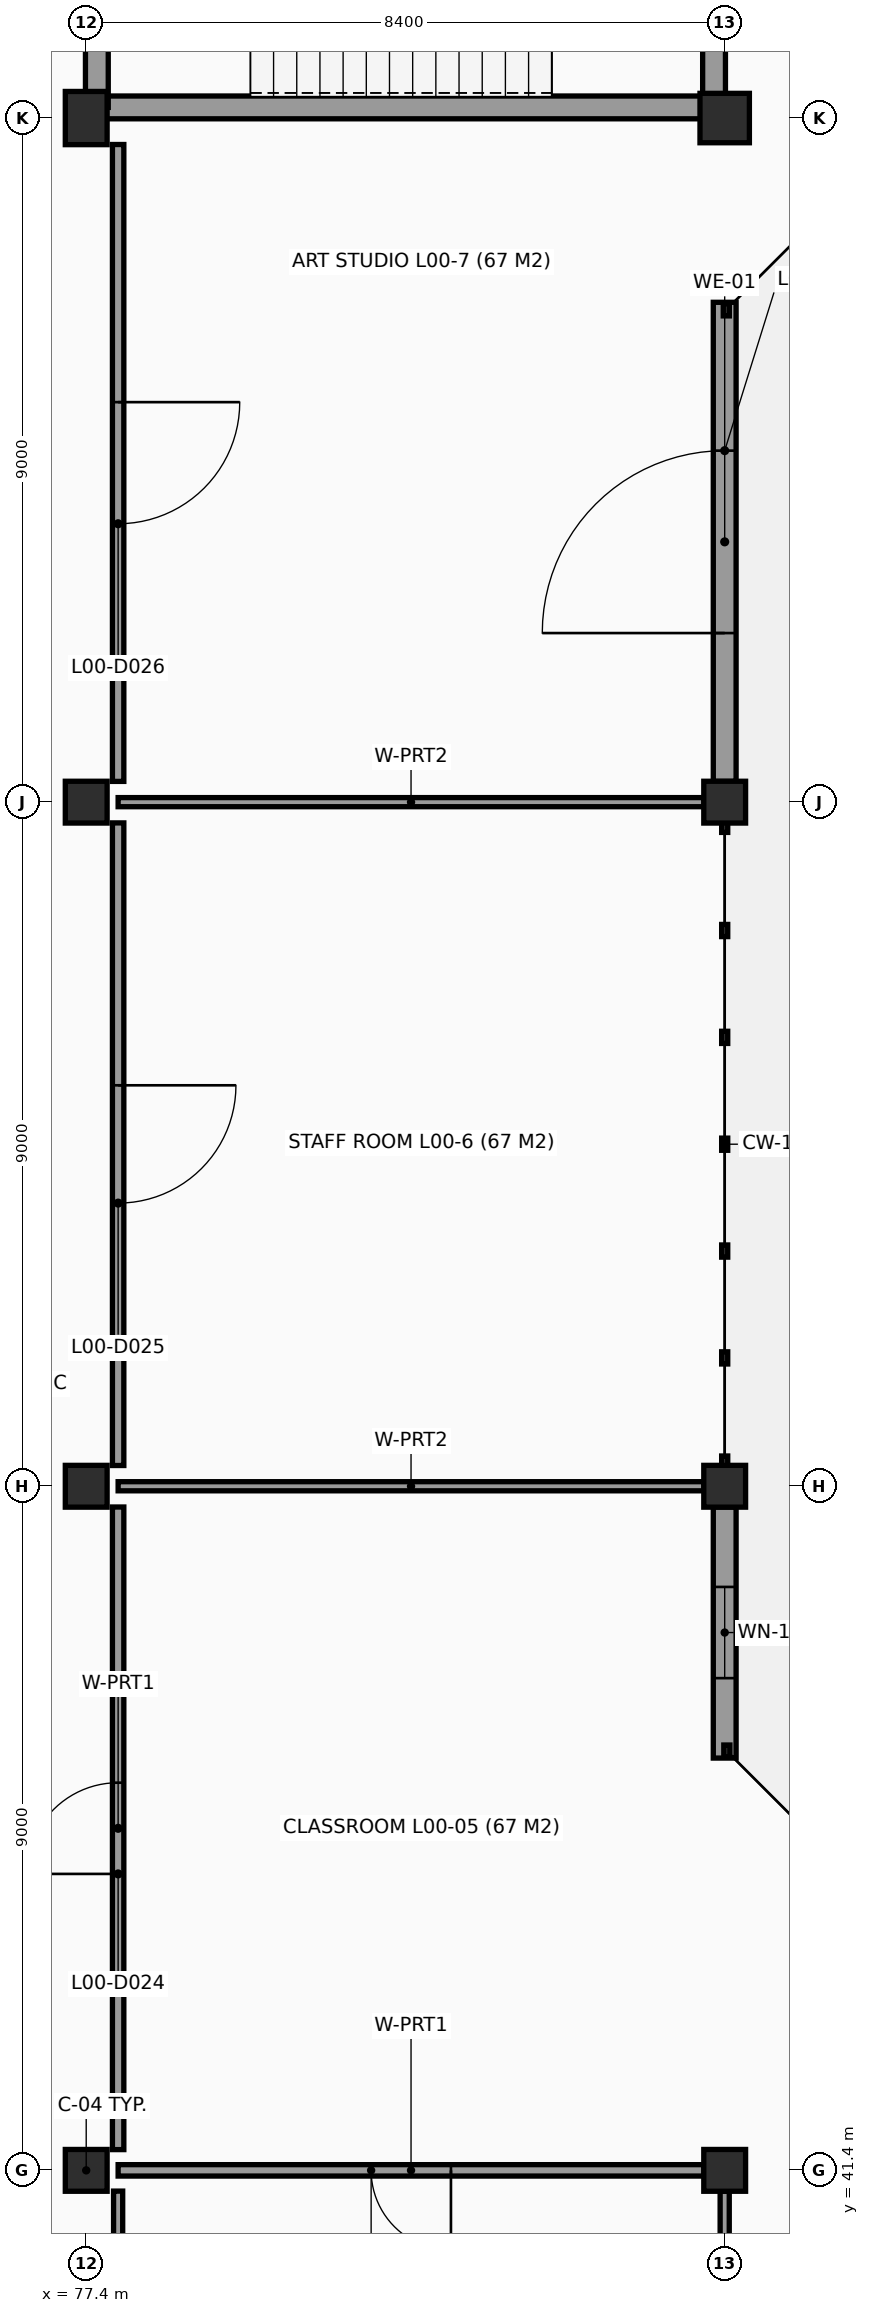
"""IFC4 building model, lengths in metres.
Left out: names, types, materials, properties, quantities, classifications, styles, units other than length and angle.
Written with IfcOpenShell. Run it as: python <this file> out.ifc"""

import sys

from ifc_helpers import new_model, si_unit, direction, frame, frame_2d, origin, origin_2d, place, context, subcontext, project, spatial, rectangle, extrude, element, fill, save


model = new_model("IFC4")
c1 = context("Model", 3, precision=1e-05, world=origin(), true_north=direction((0.0, 1.0)))
c2 = subcontext(c1, "Body", "Model", "MODEL_VIEW")
j1 = project(units=[si_unit("LENGTHUNIT", "METRE"), si_unit("PLANEANGLEUNIT", "RADIAN")], contexts=[c1])
p1 = place(None, origin())
s1 = spatial("IfcSite", under=j1, at=p1, CompositionType="ELEMENT")
p2 = place(p1, origin())
s2 = spatial("IfcBuilding", under=s1, at=p2, CompositionType="ELEMENT")
p3 = place(p2, origin())
s3 = spatial("IfcBuildingStorey", under=s2, at=p3, CompositionType="ELEMENT", Elevation=0.0)
for number, where, z_axis, x_axis in (
    (1, (77.4, 41.4, -0.4), (0.0, 0.0, 1.0), (1.0, 0.0, 0.0)),
    (2, (77.4, 50.4, -0.4), (0.0, 0.0, 1.0), (1.0, 0.0, 0.0)),
    (3, (77.4, 59.4, -0.4), (0.0, 0.0, 1.0), (1.0, 0.0, 0.0)),
):
    element("IfcColumn", number, at=place(p3, frame(where, z_axis=z_axis, x_axis=x_axis)), inside=s3, PredefinedType="COLUMN", context=c2, shape_type="SweptSolid", body=[
        extrude(rectangle(XDim=0.55, YDim=0.55, at=origin_2d()), origin(), (0.0, 0.0, 1.0), 4.6),
    ])
p4 = place(p3, frame((77.4, 68.4, -0.4), z_axis=(0.0, 0.0, 1.0), x_axis=(1.0, 0.0, 0.0)))
e4 = element("IfcColumn", 4, at=p4, inside=s3, PredefinedType="COLUMN", context=c2, shape_type="SweptSolid", body=[
    extrude(rectangle(XDim=0.55, YDim=0.7, at=origin_2d()), origin(), (0.0, 0.0, 1.0), 4.6),
])
for number, where, z_axis, x_axis in (
    (5, (85.8, 41.4, -0.4), (0.0, 0.0, 1.0), (1.0, 0.0, 0.0)),
    (6, (85.8, 50.4, -0.4), (0.0, 0.0, 1.0), (1.0, 0.0, 0.0)),
    (7, (85.8, 59.4, -0.4), (0.0, 0.0, 1.0), (1.0, 0.0, 0.0)),
):
    element("IfcColumn", number, at=place(p3, frame(where, z_axis=z_axis, x_axis=x_axis)), inside=s3, PredefinedType="COLUMN", context=c2, shape_type="SweptSolid", body=[
        extrude(rectangle(XDim=0.55, YDim=0.55, at=origin_2d()), origin(), (0.0, 0.0, 1.0), 4.6),
    ])
p5 = place(p3, frame((85.8, 68.4, -0.4), z_axis=(0.0, 0.0, 1.0), x_axis=(1.0, 0.0, 0.0)))
e8 = element("IfcColumn", 8, at=p5, inside=s3, PredefinedType="COLUMN", context=c2, shape_type="SweptSolid", body=[
    extrude(rectangle(XDim=0.65, YDim=0.65, at=origin_2d()), origin(), (0.0, 0.0, 1.0), 4.6),
])
p6 = place(p3, frame((85.8, 65.976, 0.0), z_axis=(0.0, 0.0, 1.0), x_axis=(0.0, -1.0, 0.0)))
e9 = element("IfcWall", 9, at=p6, inside=s3, PredefinedType="SOLIDWALL", context=c2, shape_type="SweptSolid", body=[
    extrude(rectangle(XDim=6.303, YDim=0.3, at=frame_2d((3.151, 0.0))), origin(), (0.0, 0.0, 1.0), 3.22),
])
p7 = place(p6, frame((1.951, 0.0, 0.0)))
e10 = element("IfcOpeningElement", 10, at=p7, cuts=e9, PredefinedType="OPENING", context=c2, shape_type="SweptSolid", body=[
    extrude(rectangle(XDim=2.4, YDim=2.45, at=frame_2d((1.2, 1.225))), frame((0.0, 0.16, 0.0), z_axis=(0.0, -1.0, 0.0), x_axis=(1.0, 0.0, 0.0)), (0.0, 0.0, 1.0), 0.32),
])
p8 = place(p3, frame((85.8, 50.127, 0.0), z_axis=(0.0, 0.0, 1.0), x_axis=(0.0, -1.0, 0.0)))
e11 = element("IfcWall", 11, at=p8, inside=s3, PredefinedType="SOLIDWALL", context=c2, shape_type="SweptSolid", body=[
    extrude(rectangle(XDim=3.303, YDim=0.3, at=frame_2d((1.651, 0.0))), origin(), (0.0, 0.0, 1.0), 3.32),
])
p9 = place(p8, frame((1.052, 0.0, 0.95)))
e12 = element("IfcOpeningElement", 12, at=p9, cuts=e11, PredefinedType="OPENING", context=c2, shape_type="SweptSolid", body=[
    extrude(rectangle(XDim=1.2, YDim=1.75, at=frame_2d((0.6, 0.875))), frame((0.0, 0.16, 0.0), z_axis=(0.0, -1.0, 0.0), x_axis=(1.0, 0.0, 0.0)), (0.0, 0.0, 1.0), 0.32),
])
p10 = place(p3, frame((77.54, 68.54, -0.4), z_axis=(0.0, 0.0, 1.0), x_axis=(1.0, 0.0, 0.0)))
e13 = element("IfcWall", 13, at=p10, inside=s3, PredefinedType="SHEAR", context=c2, shape_type="SweptSolid", body=[
    extrude(rectangle(XDim=8.12, YDim=0.3, at=frame_2d((4.06, 0.0))), origin(), (0.0, 0.0, 1.0), 4.6),
])
for number, where, z_axis, x_axis in (
    (14, (85.66, 68.54, -0.4), (0.0, 0.0, 1.0), (0.0, 1.0, 0.0)),
    (15, (77.54, 72.74, -0.4), (0.0, 0.0, 1.0), (0.0, -1.0, 0.0)),
):
    element("IfcWall", number, at=place(p3, frame(where, z_axis=z_axis, x_axis=x_axis)), inside=s3, PredefinedType="SHEAR", context=c2, shape_type="SweptSolid", body=[
        extrude(rectangle(XDim=4.2, YDim=0.3, at=frame_2d((2.1, 0.0))), origin(), (0.0, 0.0, 1.0), 4.6),
    ])
p11 = place(p3, frame((77.82, 41.4, 0.0), z_axis=(0.0, 0.0, 1.0), x_axis=(1.0, 0.0, 0.0)))
e16 = element("IfcWall", 16, at=p11, inside=s3, PredefinedType="PARTITIONING", context=c2, shape_type="SweptSolid", body=[
    extrude(rectangle(XDim=7.707, YDim=0.15, at=frame_2d((3.854, 0.0))), origin(), (0.0, 0.0, 1.0), 3.12),
])
p12 = place(p11, frame((3.329, 0.0, 0.0)))
e17 = element("IfcOpeningElement", 17, at=p12, cuts=e16, PredefinedType="OPENING", context=c2, shape_type="SweptSolid", body=[
    extrude(rectangle(XDim=1.05, YDim=2.15, at=frame_2d((0.525, 1.075))), frame((0.0, 0.085, 0.0), z_axis=(0.0, -1.0, 0.0), x_axis=(1.0, 0.0, 0.0)), (0.0, 0.0, 1.0), 0.17),
])
p13 = place(p3, frame((85.8, 41.127, 0.0), z_axis=(0.0, 0.0, 1.0), x_axis=(0.0, -1.0, 0.0)))
e18 = element("IfcWall", 18, at=p13, inside=s3, PredefinedType="PARTITIONING", context=c2, shape_type="SweptSolid", body=[
    extrude(rectangle(XDim=8.404, YDim=0.12, at=frame_2d((4.202, 0.0))), origin(), (0.0, 0.0, 1.0), 3.32),
])
p14 = place(p3, frame((77.82, 32.723, 0.0), z_axis=(0.0, 0.0, 1.0), x_axis=(0.0, 1.0, 0.0)))
e19 = element("IfcWall", 19, at=p14, inside=s3, PredefinedType="PARTITIONING", context=c2, shape_type="SweptSolid", body=[
    extrude(rectangle(XDim=8.404, YDim=0.12, at=frame_2d((4.202, 0.0))), origin(), (0.0, 0.0, 1.0), 3.59),
])
p15 = place(p3, frame((77.82, 41.673, 0.0), z_axis=(0.0, 0.0, 1.0), x_axis=(0.0, 1.0, 0.0)))
e20 = element("IfcWall", 20, at=p15, inside=s3, PredefinedType="PARTITIONING", context=c2, shape_type="SweptSolid", body=[
    extrude(rectangle(XDim=8.454, YDim=0.15, at=frame_2d((4.227, 0.0))), origin(), (0.0, 0.0, 1.0), 3.62),
])
p16 = place(p15, frame((3.627, 0.0, 0.0)))
e21 = element("IfcOpeningElement", 21, at=p16, cuts=e20, PredefinedType="OPENING", context=c2, shape_type="SweptSolid", body=[
    extrude(rectangle(XDim=1.2, YDim=2.15, at=frame_2d((0.6, 1.075))), frame((0.0, 0.085, 0.0), z_axis=(0.0, -1.0, 0.0), x_axis=(1.0, 0.0, 0.0)), (0.0, 0.0, 1.0), 0.17),
])
p17 = place(p3, frame((77.82, 50.4, 0.0), z_axis=(0.0, 0.0, 1.0), x_axis=(1.0, 0.0, 0.0)))
e22 = element("IfcWall", 22, at=p17, inside=s3, PredefinedType="PARTITIONING", context=c2, shape_type="SweptSolid", body=[
    extrude(rectangle(XDim=7.707, YDim=0.12, at=frame_2d((3.854, 0.0))), origin(), (0.0, 0.0, 1.0), 3.47),
])
p18 = place(p3, frame((77.82, 50.673, 0.0), z_axis=(0.0, 0.0, 1.0), x_axis=(0.0, 1.0, 0.0)))
e23 = element("IfcWall", 23, at=p18, inside=s3, PredefinedType="PARTITIONING", context=c2, shape_type="SweptSolid", body=[
    extrude(rectangle(XDim=8.454, YDim=0.15, at=frame_2d((4.227, 0.0))), origin(), (0.0, 0.0, 1.0), 3.65),
])
p19 = place(p18, frame((3.452, 0.0, 0.0)))
e24 = element("IfcOpeningElement", 24, at=p19, cuts=e23, PredefinedType="OPENING", context=c2, shape_type="SweptSolid", body=[
    extrude(rectangle(XDim=1.55, YDim=2.2, at=frame_2d((0.775, 1.1))), frame((0.0, 0.085, 0.0), z_axis=(0.0, -1.0, 0.0), x_axis=(1.0, 0.0, 0.0)), (0.0, 0.0, 1.0), 0.17),
])
p20 = place(p3, frame((77.82, 59.4, 0.0), z_axis=(0.0, 0.0, 1.0), x_axis=(1.0, 0.0, 0.0)))
e25 = element("IfcWall", 25, at=p20, inside=s3, PredefinedType="PARTITIONING", context=c2, shape_type="SweptSolid", body=[
    extrude(rectangle(XDim=7.707, YDim=0.12, at=frame_2d((3.854, 0.0))), origin(), (0.0, 0.0, 1.0), 3.53),
])
p21 = place(p3, frame((77.82, 59.673, 0.0), z_axis=(0.0, 0.0, 1.0), x_axis=(0.0, 1.0, 0.0)))
e26 = element("IfcWall", 26, at=p21, inside=s3, PredefinedType="PARTITIONING", context=c2, shape_type="SweptSolid", body=[
    extrude(rectangle(XDim=8.379, YDim=0.15, at=frame_2d((4.189, 0.0))), origin(), (0.0, 0.0, 1.0), 3.42),
])
p22 = place(p21, frame((3.389, 0.0, 0.0)))
e27 = element("IfcOpeningElement", 27, at=p22, cuts=e26, PredefinedType="OPENING", context=c2, shape_type="SweptSolid", body=[
    extrude(rectangle(XDim=1.6, YDim=2.2, at=frame_2d((0.8, 1.1))), frame((0.0, 0.085, 0.0), z_axis=(0.0, -1.0, 0.0), x_axis=(1.0, 0.0, 0.0)), (0.0, 0.0, 1.0), 0.17),
])
p23 = place(p7, origin())
e28 = element("IfcDoor", 28, at=p23, inside=s3, OperationType="DOUBLE_DOOR_SINGLE_SWING", PredefinedType="DOOR", context=c2, shape_type="SweptSolid", body=[
    extrude(rectangle(XDim=2.4, YDim=2.45, at=frame_2d((1.2, 1.225))), frame((0.0, 0.025, 0.0), z_axis=(0.0, -1.0, 0.0), x_axis=(1.0, 0.0, 0.0)), (0.0, 0.0, 1.0), 0.05),
])
fill(e10, e28)
p24 = place(p9, origin())
e29 = element("IfcWindow", 29, at=p24, inside=s3, PartitioningType="SINGLE_PANEL", PredefinedType="WINDOW", context=c2, shape_type="SweptSolid", body=[
    extrude(rectangle(XDim=1.2, YDim=1.75, at=frame_2d((0.6, 0.875))), frame((0.0, 0.03, 0.0), z_axis=(0.0, -1.0, 0.0), x_axis=(1.0, 0.0, 0.0)), (0.0, 0.0, 1.0), 0.06),
])
fill(e12, e29)
p25 = place(p12, origin())
e30 = element("IfcDoor", 30, at=p25, inside=s3, OperationType="SINGLE_SWING_RIGHT", PredefinedType="DOOR", context=c2, shape_type="SweptSolid", body=[
    extrude(rectangle(XDim=1.05, YDim=2.15, at=frame_2d((0.525, 1.075))), frame((0.0, 0.025, 0.0), z_axis=(0.0, -1.0, 0.0), x_axis=(1.0, 0.0, 0.0)), (0.0, 0.0, 1.0), 0.05),
])
fill(e17, e30)
p26 = place(p16, origin())
e31 = element("IfcDoor", 31, at=p26, inside=s3, OperationType="SINGLE_SWING_LEFT", PredefinedType="DOOR", context=c2, shape_type="SweptSolid", body=[
    extrude(rectangle(XDim=1.2, YDim=2.15, at=frame_2d((0.6, 1.075))), frame((0.0, 0.025, 0.0), z_axis=(0.0, -1.0, 0.0), x_axis=(1.0, 0.0, 0.0)), (0.0, 0.0, 1.0), 0.05),
])
fill(e21, e31)
p27 = place(p19, origin())
e32 = element("IfcDoor", 32, at=p27, inside=s3, OperationType="DOUBLE_DOOR_SINGLE_SWING", PredefinedType="DOOR", context=c2, shape_type="SweptSolid", body=[
    extrude(rectangle(XDim=1.55, YDim=2.2, at=frame_2d((0.775, 1.1))), frame((0.0, 0.025, 0.0), z_axis=(0.0, -1.0, 0.0), x_axis=(1.0, 0.0, 0.0)), (0.0, 0.0, 1.0), 0.05),
])
fill(e24, e32)
p28 = place(p22, origin())
e33 = element("IfcDoor", 33, at=p28, inside=s3, OperationType="DOUBLE_DOOR_SINGLE_SWING", PredefinedType="DOOR", context=c2, shape_type="SweptSolid", body=[
    extrude(rectangle(XDim=1.6, YDim=2.2, at=frame_2d((0.8, 1.1))), frame((0.0, 0.025, 0.0), z_axis=(0.0, -1.0, 0.0), x_axis=(1.0, 0.0, 0.0)), (0.0, 0.0, 1.0), 0.05),
])
fill(e27, e33)
save(model, sys.argv[1])
